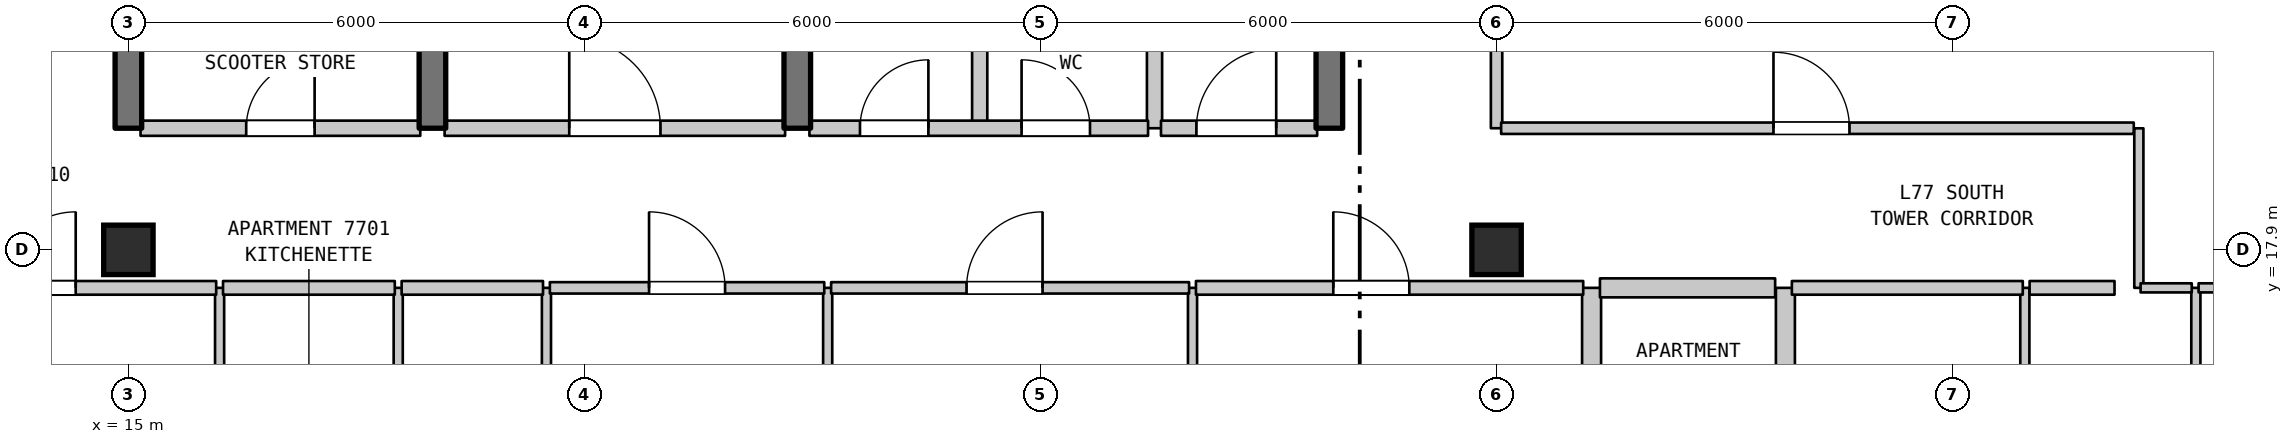
"""IFC4 building model, lengths in metres.
Left out: names, types, materials, properties, quantities, classifications, styles, units other than length and angle.
Written with IfcOpenShell. Run it as: python <this file> out.ifc"""

import sys

from ifc_helpers import new_model, si_unit, direction, frame, frame_2d, origin, origin_2d, place, context, subcontext, project, spatial, rectangle, extrude, element, fill, save


model = new_model("IFC4")
c1 = context("Model", 3, precision=1e-05, world=origin(), true_north=direction((0.0, 1.0)))
c2 = subcontext(c1, "Body", "Model", "MODEL_VIEW")
j1 = project(units=[si_unit("LENGTHUNIT", "METRE"), si_unit("PLANEANGLEUNIT", "RADIAN")], contexts=[c1])
p1 = place(None, origin())
s1 = spatial("IfcSite", under=j1, at=p1, CompositionType="ELEMENT")
p2 = place(p1, origin())
s2 = spatial("IfcBuilding", under=s1, at=p2, CompositionType="ELEMENT")
p3 = place(p2, frame((0.0, 0.0, 307.3)))
s3 = spatial("IfcBuildingStorey", under=s2, at=p3, CompositionType="ELEMENT", Elevation=307.3)
for number, where, z_axis, x_axis in (
    (1, (15.0, 17.9, 0.0), (0.0, 0.0, 1.0), (1.0, 0.0, 0.0)),
    (2, (33.0, 17.9, 0.0), (0.0, 0.0, 1.0), (1.0, 0.0, 0.0)),
):
    element("IfcColumn", number, at=place(p3, frame(where, z_axis=z_axis, x_axis=x_axis)), inside=s3, PredefinedType="COLUMN", context=c2, shape_type="SweptSolid", body=[
        extrude(rectangle(XDim=0.65, YDim=0.65, at=origin_2d()), origin(), (0.0, 0.0, 1.0), 3.7),
    ])
p4 = place(p3, frame((15.0, 19.5, 0.0), z_axis=(0.0, 0.0, 1.0), x_axis=(0.0, 1.0, 0.0)))
e3 = element("IfcWall", 3, at=p4, inside=s3, PredefinedType="SHEAR", context=c2, shape_type="SweptSolid", body=[
    extrude(rectangle(XDim=3.2, YDim=0.35, at=frame_2d((1.6, 0.0))), origin(), (0.0, 0.0, 1.0), 3.39),
])
p5 = place(p3, frame((16.2, 14.2, 0.0), z_axis=(0.0, 0.0, 1.0), x_axis=(0.0, 1.0, 0.0)))
e4 = element("IfcWall", 4, at=p5, inside=s3, PredefinedType="PARTITIONING", context=c2, shape_type="SweptSolid", body=[
    extrude(rectangle(XDim=3.2, YDim=0.12, at=frame_2d((1.6, 0.0))), origin(), (0.0, 0.0, 1.0), 3.39),
])
p6 = place(p5, frame((1.15, 0.0, 0.0)))
e5 = element("IfcOpeningElement", 5, at=p6, cuts=e4, PredefinedType="OPENING", context=c2, shape_type="SweptSolid", body=[
    extrude(rectangle(XDim=0.9, YDim=2.15, at=frame_2d((0.45, 1.075))), frame((0.0, 0.07, 0.0), z_axis=(0.0, -1.0, 0.0), x_axis=(1.0, 0.0, 0.0)), (0.0, 0.0, 1.0), 0.14),
])
p7 = place(p3, frame((18.55, 14.2, 0.0), z_axis=(0.0, 0.0, 1.0), x_axis=(0.0, 1.0, 0.0)))
e6 = element("IfcWall", 6, at=p7, inside=s3, PredefinedType="PARTITIONING", context=c2, shape_type="SweptSolid", body=[
    extrude(rectangle(XDim=3.2, YDim=0.12, at=frame_2d((1.6, 0.0))), origin(), (0.0, 0.0, 1.0), 3.39),
])
p8 = place(p3, frame((19.0, 19.5, 0.0), z_axis=(0.0, 0.0, 1.0), x_axis=(0.0, 1.0, 0.0)))
e7 = element("IfcWall", 7, at=p8, inside=s3, PredefinedType="SHEAR", context=c2, shape_type="SweptSolid", body=[
    extrude(rectangle(XDim=3.2, YDim=0.35, at=frame_2d((1.6, 0.0))), origin(), (0.0, 0.0, 1.0), 3.39),
])
p9 = place(p3, frame((20.5, 7.189, 0.0), z_axis=(0.0, 0.0, 1.0), x_axis=(0.0, 1.0, 0.0)))
e8 = element("IfcWall", 8, at=p9, inside=s3, PredefinedType="PARTITIONING", context=c2, shape_type="SweptSolid", body=[
    extrude(rectangle(XDim=10.211, YDim=0.12, at=frame_2d((5.105, 0.0))), origin(), (0.0, 0.0, 1.0), 3.39),
])
p10 = place(p3, frame((23.8, 19.5, 0.0), z_axis=(0.0, 0.0, 1.0), x_axis=(0.0, 1.0, 0.0)))
e9 = element("IfcWall", 9, at=p10, inside=s3, PredefinedType="SHEAR", context=c2, shape_type="SweptSolid", body=[
    extrude(rectangle(XDim=3.2, YDim=0.35, at=frame_2d((1.6, 0.0))), origin(), (0.0, 0.0, 1.0), 3.39),
])
p11 = place(p3, frame((24.2, 6.71, 0.0), z_axis=(0.0, 0.0, 1.0), x_axis=(0.0, 1.0, 0.0)))
e10 = element("IfcWall", 10, at=p11, inside=s3, PredefinedType="PARTITIONING", context=c2, shape_type="SweptSolid", body=[
    extrude(rectangle(XDim=10.69, YDim=0.12, at=frame_2d((5.345, 0.0))), origin(), (0.0, 0.0, 1.0), 3.39),
])
for number, where, z_axis, x_axis in (
    (11, (26.2, 19.5, 0.0), (0.0, 0.0, 1.0), (0.0, 1.0, 0.0)),
    (12, (28.5, 19.5, 0.0), (0.0, 0.0, 1.0), (0.0, 1.0, 0.0)),
):
    element("IfcWall", number, at=place(p3, frame(where, z_axis=z_axis, x_axis=x_axis)), inside=s3, PredefinedType="STANDARD", context=c2, shape_type="SweptSolid", body=[
        extrude(rectangle(XDim=3.2, YDim=0.2, at=frame_2d((1.6, 0.0))), origin(), (0.0, 0.0, 1.0), 3.39),
    ])
p12 = place(p3, frame((29.0, 6.71, 0.0), z_axis=(0.0, 0.0, 1.0), x_axis=(0.0, 1.0, 0.0)))
e13 = element("IfcWall", 13, at=p12, inside=s3, PredefinedType="PARTITIONING", context=c2, shape_type="SweptSolid", body=[
    extrude(rectangle(XDim=10.69, YDim=0.12, at=frame_2d((5.345, 0.0))), origin(), (0.0, 0.0, 1.0), 3.39),
])
p13 = place(p3, frame((30.8, 19.5, 0.0), z_axis=(0.0, 0.0, 1.0), x_axis=(0.0, 1.0, 0.0)))
e14 = element("IfcWall", 14, at=p13, inside=s3, PredefinedType="SHEAR", context=c2, shape_type="SweptSolid", body=[
    extrude(rectangle(XDim=3.2, YDim=0.35, at=frame_2d((1.6, 0.0))), origin(), (0.0, 0.0, 1.0), 3.39),
])
p14 = place(p3, frame((33.0, 19.5, 0.0), z_axis=(0.0, 0.0, 1.0), x_axis=(0.0, 1.0, 0.0)))
e15 = element("IfcWall", 15, at=p14, inside=s3, PredefinedType="STANDARD", context=c2, shape_type="SweptSolid", body=[
    extrude(rectangle(XDim=8.4, YDim=0.15, at=frame_2d((4.2, 0.0))), origin(), (0.0, 0.0, 1.0), 3.1),
])
for number, where, z_axis, x_axis in (
    (16, (34.25, 13.62, 0.0), (0.0, 0.0, 1.0), (0.0, 1.0, 0.0)),
    (17, (36.8, 13.62, 0.0), (0.0, 0.0, 1.0), (0.0, 1.0, 0.0)),
):
    element("IfcWall", number, at=place(p3, frame(where, z_axis=z_axis, x_axis=x_axis)), inside=s3, PredefinedType="STANDARD", context=c2, shape_type="SweptSolid", body=[
        extrude(rectangle(XDim=3.78, YDim=0.25, at=frame_2d((1.89, 0.0))), origin(), (0.0, 0.0, 1.0), 3.39),
    ])
p15 = place(p3, frame((39.95, 13.62, 0.0), z_axis=(0.0, 0.0, 1.0), x_axis=(0.0, 1.0, 0.0)))
e18 = element("IfcWall", 18, at=p15, inside=s3, PredefinedType="PARTITIONING", context=c2, shape_type="SweptSolid", body=[
    extrude(rectangle(XDim=3.78, YDim=0.12, at=frame_2d((1.89, 0.0))), origin(), (0.0, 0.0, 1.0), 3.39),
])
p16 = place(p3, frame((41.45, 17.4, 0.0), z_axis=(0.0, 0.0, 1.0), x_axis=(0.0, 1.0, 0.0)))
e19 = element("IfcWall", 19, at=p16, inside=s3, PredefinedType="PARTITIONING", context=c2, shape_type="SweptSolid", body=[
    extrude(rectangle(XDim=2.099, YDim=0.12, at=frame_2d((1.05, 0.0))), origin(), (0.0, 0.0, 1.0), 3.39),
])
p17 = place(p3, frame((42.2, 13.62, 0.0), z_axis=(0.0, 0.0, 1.0), x_axis=(0.0, 1.0, 0.0)))
e20 = element("IfcWall", 20, at=p17, inside=s3, PredefinedType="PARTITIONING", context=c2, shape_type="SweptSolid", body=[
    extrude(rectangle(XDim=3.78, YDim=0.12, at=frame_2d((1.89, 0.0))), origin(), (0.0, 0.0, 1.0), 3.39),
])
p18 = place(p3, frame((12.975, 17.4, 0.0), z_axis=(0.0, 0.0, 1.0), x_axis=(1.0, 0.0, 0.0)))
e21 = element("IfcWall", 21, at=p18, inside=s3, PredefinedType="STANDARD", context=c2, shape_type="SweptSolid", body=[
    extrude(rectangle(XDim=3.18, YDim=0.18, at=frame_2d((1.59, 0.0))), origin(), (0.0, 0.0, 1.0), 3.39),
])
p19 = place(p18, frame((0.332, 0.0, 0.0)))
e22 = element("IfcOpeningElement", 22, at=p19, cuts=e21, PredefinedType="OPENING", context=c2, shape_type="SweptSolid", body=[
    extrude(rectangle(XDim=1.0, YDim=2.15, at=frame_2d((0.5, 1.075))), frame((0.0, 0.1, 0.0), z_axis=(0.0, -1.0, 0.0), x_axis=(1.0, 0.0, 0.0)), (0.0, 0.0, 1.0), 0.2),
])
p20 = place(p3, frame((16.245, 17.4, 0.0), z_axis=(0.0, 0.0, 1.0), x_axis=(1.0, 0.0, 0.0)))
e23 = element("IfcWall", 23, at=p20, inside=s3, PredefinedType="STANDARD", context=c2, shape_type="SweptSolid", body=[
    extrude(rectangle(XDim=2.26, YDim=0.18, at=frame_2d((1.13, 0.0))), origin(), (0.0, 0.0, 1.0), 3.39),
])
p21 = place(p3, frame((18.595, 17.4, 0.0), z_axis=(0.0, 0.0, 1.0), x_axis=(1.0, 0.0, 0.0)))
e24 = element("IfcWall", 24, at=p21, inside=s3, PredefinedType="STANDARD", context=c2, shape_type="SweptSolid", body=[
    extrude(rectangle(XDim=1.86, YDim=0.18, at=frame_2d((0.93, 0.0))), origin(), (0.0, 0.0, 1.0), 3.39),
])
p22 = place(p3, frame((20.545, 17.4, 0.0), z_axis=(0.0, 0.0, 1.0), x_axis=(1.0, 0.0, 0.0)))
e25 = element("IfcWall", 25, at=p22, inside=s3, PredefinedType="STANDARD", context=c2, shape_type="SweptSolid", body=[
    extrude(rectangle(XDim=3.61, YDim=0.15, at=frame_2d((1.805, 0.0))), origin(), (0.0, 0.0, 1.0), 3.39),
])
p23 = place(p22, frame((1.305, 0.0, 0.0)))
e26 = element("IfcOpeningElement", 26, at=p23, cuts=e25, PredefinedType="OPENING", context=c2, shape_type="SweptSolid", body=[
    extrude(rectangle(XDim=1.0, YDim=2.15, at=frame_2d((0.5, 1.075))), frame((0.0, 0.085, 0.0), z_axis=(0.0, -1.0, 0.0), x_axis=(1.0, 0.0, 0.0)), (0.0, 0.0, 1.0), 0.17),
])
p24 = place(p3, frame((24.245, 17.4, 0.0), z_axis=(0.0, 0.0, 1.0), x_axis=(1.0, 0.0, 0.0)))
e27 = element("IfcWall", 27, at=p24, inside=s3, PredefinedType="STANDARD", context=c2, shape_type="SweptSolid", body=[
    extrude(rectangle(XDim=4.71, YDim=0.15, at=frame_2d((2.355, 0.0))), origin(), (0.0, 0.0, 1.0), 3.39),
])
p25 = place(p24, frame((1.782, 0.0, 0.0)))
e28 = element("IfcOpeningElement", 28, at=p25, cuts=e27, PredefinedType="OPENING", context=c2, shape_type="SweptSolid", body=[
    extrude(rectangle(XDim=1.0, YDim=2.15, at=frame_2d((0.5, 1.075))), frame((0.0, 0.085, 0.0), z_axis=(0.0, -1.0, 0.0), x_axis=(1.0, 0.0, 0.0)), (0.0, 0.0, 1.0), 0.17),
])
p26 = place(p3, frame((29.045, 17.4, 0.0), z_axis=(0.0, 0.0, 1.0), x_axis=(1.0, 0.0, 0.0)))
e29 = element("IfcWall", 29, at=p26, inside=s3, PredefinedType="STANDARD", context=c2, shape_type="SweptSolid", body=[
    extrude(rectangle(XDim=5.095, YDim=0.18, at=frame_2d((2.547, 0.0))), origin(), (0.0, 0.0, 1.0), 3.39),
])
p27 = place(p26, frame((1.807, 0.0, 0.0)))
e30 = element("IfcOpeningElement", 30, at=p27, cuts=e29, PredefinedType="OPENING", context=c2, shape_type="SweptSolid", body=[
    extrude(rectangle(XDim=1.0, YDim=2.15, at=frame_2d((0.5, 1.075))), frame((0.0, 0.1, 0.0), z_axis=(0.0, -1.0, 0.0), x_axis=(1.0, 0.0, 0.0)), (0.0, 0.0, 1.0), 0.2),
])
p28 = place(p3, frame((34.36, 17.4, 0.0), z_axis=(0.0, 0.0, 1.0), x_axis=(1.0, 0.0, 0.0)))
e31 = element("IfcWall", 31, at=p28, inside=s3, PredefinedType="STANDARD", context=c2, shape_type="SweptSolid", body=[
    extrude(rectangle(XDim=2.305, YDim=0.25, at=frame_2d((1.152, 0.0))), origin(), (0.0, 0.0, 1.0), 3.39),
])
p29 = place(p3, frame((36.885, 17.4, 0.0), z_axis=(0.0, 0.0, 1.0), x_axis=(1.0, 0.0, 0.0)))
e32 = element("IfcWall", 32, at=p29, inside=s3, PredefinedType="STANDARD", context=c2, shape_type="SweptSolid", body=[
    extrude(rectangle(XDim=3.038, YDim=0.18, at=frame_2d((1.519, 0.0))), origin(), (0.0, 0.0, 1.0), 3.39),
])
p30 = place(p3, frame((40.013, 17.4, 0.0), z_axis=(0.0, 0.0, 1.0), x_axis=(1.0, 0.0, 0.0)))
e33 = element("IfcWall", 33, at=p30, inside=s3, PredefinedType="STANDARD", context=c2, shape_type="SweptSolid", body=[
    extrude(rectangle(XDim=1.117, YDim=0.18, at=frame_2d((0.559, 0.0))), origin(), (0.0, 0.0, 1.0), 3.39),
])
p31 = place(p3, frame((41.473, 17.4, 0.0), z_axis=(0.0, 0.0, 1.0), x_axis=(1.0, 0.0, 0.0)))
e34 = element("IfcWall", 34, at=p31, inside=s3, PredefinedType="PARTITIONING", context=c2, shape_type="SweptSolid", body=[
    extrude(rectangle(XDim=0.673, YDim=0.12, at=frame_2d((0.336, 0.0))), origin(), (0.0, 0.0, 1.0), 3.39),
])
p32 = place(p3, frame((42.236, 17.4, 0.0), z_axis=(0.0, 0.0, 1.0), x_axis=(1.0, 0.0, 0.0)))
e35 = element("IfcWall", 35, at=p32, inside=s3, PredefinedType="PARTITIONING", context=c2, shape_type="SweptSolid", body=[
    extrude(rectangle(XDim=1.268, YDim=0.12, at=frame_2d((0.634, 0.0))), origin(), (0.0, 0.0, 1.0), 3.39),
])
p33 = place(p3, frame((15.16, 19.5, 0.0), z_axis=(0.0, 0.0, 1.0), x_axis=(1.0, 0.0, 0.0)))
e36 = element("IfcWall", 36, at=p33, inside=s3, PredefinedType="STANDARD", context=c2, shape_type="SweptSolid", body=[
    extrude(rectangle(XDim=3.68, YDim=0.2, at=frame_2d((1.84, 0.0))), origin(), (0.0, 0.0, 1.0), 3.39),
])
p34 = place(p33, frame((1.39, 0.0, 0.0)))
e37 = element("IfcOpeningElement", 37, at=p34, cuts=e36, PredefinedType="OPENING", context=c2, shape_type="SweptSolid", body=[
    extrude(rectangle(XDim=0.9, YDim=2.15, at=frame_2d((0.45, 1.075))), frame((0.0, 0.11, 0.0), z_axis=(0.0, -1.0, 0.0), x_axis=(1.0, 0.0, 0.0)), (0.0, 0.0, 1.0), 0.22),
])
p35 = place(p3, frame((19.16, 19.5, 0.0), z_axis=(0.0, 0.0, 1.0), x_axis=(1.0, 0.0, 0.0)))
e38 = element("IfcWall", 38, at=p35, inside=s3, PredefinedType="STANDARD", context=c2, shape_type="SweptSolid", body=[
    extrude(rectangle(XDim=4.48, YDim=0.2, at=frame_2d((2.24, 0.0))), origin(), (0.0, 0.0, 1.0), 3.39),
])
p36 = place(p35, frame((1.64, 0.0, 0.0)))
e39 = element("IfcOpeningElement", 39, at=p36, cuts=e38, PredefinedType="OPENING", context=c2, shape_type="SweptSolid", body=[
    extrude(rectangle(XDim=1.2, YDim=2.2, at=frame_2d((0.6, 1.1))), frame((0.0, 0.11, 0.0), z_axis=(0.0, -1.0, 0.0), x_axis=(1.0, 0.0, 0.0)), (0.0, 0.0, 1.0), 0.22),
])
p37 = place(p3, frame((23.96, 19.5, 0.0), z_axis=(0.0, 0.0, 1.0), x_axis=(1.0, 0.0, 0.0)))
e40 = element("IfcWall", 40, at=p37, inside=s3, PredefinedType="STANDARD", context=c2, shape_type="SweptSolid", body=[
    extrude(rectangle(XDim=4.455, YDim=0.2, at=frame_2d((2.228, 0.0))), origin(), (0.0, 0.0, 1.0), 3.39),
])
p38 = place(p37, frame((0.665, 0.0, 0.0)))
e41 = element("IfcOpeningElement", 41, at=p38, cuts=e40, PredefinedType="OPENING", context=c2, shape_type="SweptSolid", body=[
    extrude(rectangle(XDim=0.9, YDim=2.15, at=frame_2d((0.45, 1.075))), frame((0.0, 0.11, 0.0), z_axis=(0.0, -1.0, 0.0), x_axis=(1.0, 0.0, 0.0)), (0.0, 0.0, 1.0), 0.22),
])
p39 = place(p37, frame((2.791, 0.0, 0.0)))
e42 = element("IfcOpeningElement", 42, at=p39, cuts=e40, PredefinedType="OPENING", context=c2, shape_type="SweptSolid", body=[
    extrude(rectangle(XDim=0.9, YDim=2.15, at=frame_2d((0.45, 1.075))), frame((0.0, 0.11, 0.0), z_axis=(0.0, -1.0, 0.0), x_axis=(1.0, 0.0, 0.0)), (0.0, 0.0, 1.0), 0.22),
])
p40 = place(p3, frame((28.585, 19.5, 0.0), z_axis=(0.0, 0.0, 1.0), x_axis=(1.0, 0.0, 0.0)))
e43 = element("IfcWall", 43, at=p40, inside=s3, PredefinedType="STANDARD", context=c2, shape_type="SweptSolid", body=[
    extrude(rectangle(XDim=2.055, YDim=0.2, at=frame_2d((1.027, 0.0))), origin(), (0.0, 0.0, 1.0), 3.39),
])
p41 = place(p40, frame((0.466, 0.0, 0.0)))
e44 = element("IfcOpeningElement", 44, at=p41, cuts=e43, PredefinedType="OPENING", context=c2, shape_type="SweptSolid", body=[
    extrude(rectangle(XDim=1.05, YDim=2.15, at=frame_2d((0.525, 1.075))), frame((0.0, 0.11, 0.0), z_axis=(0.0, -1.0, 0.0), x_axis=(1.0, 0.0, 0.0)), (0.0, 0.0, 1.0), 0.22),
])
p42 = place(p3, frame((33.06, 19.5, 0.0), z_axis=(0.0, 0.0, 1.0), x_axis=(1.0, 0.0, 0.0)))
e45 = element("IfcWall", 45, at=p42, inside=s3, PredefinedType="STANDARD", context=c2, shape_type="SweptSolid", body=[
    extrude(rectangle(XDim=8.323, YDim=0.15, at=frame_2d((4.162, 0.0))), origin(), (0.0, 0.0, 1.0), 3.39),
])
p43 = place(p42, frame((3.583, 0.0, 0.0)))
e46 = element("IfcOpeningElement", 46, at=p43, cuts=e45, PredefinedType="OPENING", context=c2, shape_type="SweptSolid", body=[
    extrude(rectangle(XDim=1.0, YDim=2.15, at=frame_2d((0.5, 1.075))), frame((0.0, 0.085, 0.0), z_axis=(0.0, -1.0, 0.0), x_axis=(1.0, 0.0, 0.0)), (0.0, 0.0, 1.0), 0.17),
])
p44 = place(p19, origin())
e47 = element("IfcDoor", 47, at=p44, inside=s3, OperationType="SINGLE_SWING_RIGHT", PredefinedType="DOOR", context=c2, shape_type="SweptSolid", body=[
    extrude(rectangle(XDim=1.0, YDim=2.15, at=frame_2d((0.5, 1.075))), frame((0.0, 0.025, 0.0), z_axis=(0.0, -1.0, 0.0), x_axis=(1.0, 0.0, 0.0)), (0.0, 0.0, 1.0), 0.05),
])
fill(e22, e47)
p45 = place(p23, origin())
e48 = element("IfcDoor", 48, at=p45, inside=s3, OperationType="SINGLE_SWING_LEFT", PredefinedType="DOOR", context=c2, shape_type="SweptSolid", body=[
    extrude(rectangle(XDim=1.0, YDim=2.15, at=frame_2d((0.5, 1.075))), frame((0.0, 0.025, 0.0), z_axis=(0.0, -1.0, 0.0), x_axis=(1.0, 0.0, 0.0)), (0.0, 0.0, 1.0), 0.05),
])
fill(e26, e48)
p46 = place(p25, origin())
e49 = element("IfcDoor", 49, at=p46, inside=s3, OperationType="SINGLE_SWING_RIGHT", PredefinedType="DOOR", context=c2, shape_type="SweptSolid", body=[
    extrude(rectangle(XDim=1.0, YDim=2.15, at=frame_2d((0.5, 1.075))), frame((0.0, 0.025, 0.0), z_axis=(0.0, -1.0, 0.0), x_axis=(1.0, 0.0, 0.0)), (0.0, 0.0, 1.0), 0.05),
])
fill(e28, e49)
p47 = place(p27, origin())
e50 = element("IfcDoor", 50, at=p47, inside=s3, OperationType="SINGLE_SWING_LEFT", PredefinedType="DOOR", context=c2, shape_type="SweptSolid", body=[
    extrude(rectangle(XDim=1.0, YDim=2.15, at=frame_2d((0.5, 1.075))), frame((0.0, 0.025, 0.0), z_axis=(0.0, -1.0, 0.0), x_axis=(1.0, 0.0, 0.0)), (0.0, 0.0, 1.0), 0.05),
])
fill(e30, e50)
p48 = place(p34, origin())
e51 = element("IfcDoor", 51, at=p48, inside=s3, OperationType="SINGLE_SWING_RIGHT", PredefinedType="DOOR", context=c2, shape_type="SweptSolid", body=[
    extrude(rectangle(XDim=0.9, YDim=2.15, at=frame_2d((0.45, 1.075))), frame((0.0, 0.025, 0.0), z_axis=(0.0, -1.0, 0.0), x_axis=(1.0, 0.0, 0.0)), (0.0, 0.0, 1.0), 0.05),
])
fill(e37, e51)
p49 = place(p36, origin())
e52 = element("IfcDoor", 52, at=p49, inside=s3, OperationType="SINGLE_SWING_LEFT", PredefinedType="DOOR", context=c2, shape_type="SweptSolid", body=[
    extrude(rectangle(XDim=1.2, YDim=2.2, at=frame_2d((0.6, 1.1))), frame((0.0, 0.025, 0.0), z_axis=(0.0, -1.0, 0.0), x_axis=(1.0, 0.0, 0.0)), (0.0, 0.0, 1.0), 0.05),
])
fill(e39, e52)
p50 = place(p38, origin())
e53 = element("IfcDoor", 53, at=p50, inside=s3, OperationType="SINGLE_SWING_RIGHT", PredefinedType="DOOR", context=c2, shape_type="SweptSolid", body=[
    extrude(rectangle(XDim=0.9, YDim=2.15, at=frame_2d((0.45, 1.075))), frame((0.0, 0.025, 0.0), z_axis=(0.0, -1.0, 0.0), x_axis=(1.0, 0.0, 0.0)), (0.0, 0.0, 1.0), 0.05),
])
fill(e41, e53)
p51 = place(p39, origin())
e54 = element("IfcDoor", 54, at=p51, inside=s3, OperationType="SINGLE_SWING_LEFT", PredefinedType="DOOR", context=c2, shape_type="SweptSolid", body=[
    extrude(rectangle(XDim=0.9, YDim=2.15, at=frame_2d((0.45, 1.075))), frame((0.0, 0.025, 0.0), z_axis=(0.0, -1.0, 0.0), x_axis=(1.0, 0.0, 0.0)), (0.0, 0.0, 1.0), 0.05),
])
fill(e42, e54)
p52 = place(p41, origin())
e55 = element("IfcDoor", 55, at=p52, inside=s3, OperationType="SINGLE_SWING_RIGHT", PredefinedType="DOOR", context=c2, shape_type="SweptSolid", body=[
    extrude(rectangle(XDim=1.05, YDim=2.15, at=frame_2d((0.525, 1.075))), frame((0.0, 0.025, 0.0), z_axis=(0.0, -1.0, 0.0), x_axis=(1.0, 0.0, 0.0)), (0.0, 0.0, 1.0), 0.05),
])
fill(e44, e55)
p53 = place(p43, origin())
e56 = element("IfcDoor", 56, at=p53, inside=s3, OperationType="SINGLE_SWING_LEFT", PredefinedType="DOOR", context=c2, shape_type="SweptSolid", body=[
    extrude(rectangle(XDim=1.0, YDim=2.15, at=frame_2d((0.5, 1.075))), frame((0.0, 0.025, 0.0), z_axis=(0.0, -1.0, 0.0), x_axis=(1.0, 0.0, 0.0)), (0.0, 0.0, 1.0), 0.05),
])
fill(e46, e56)
save(model, sys.argv[1])
